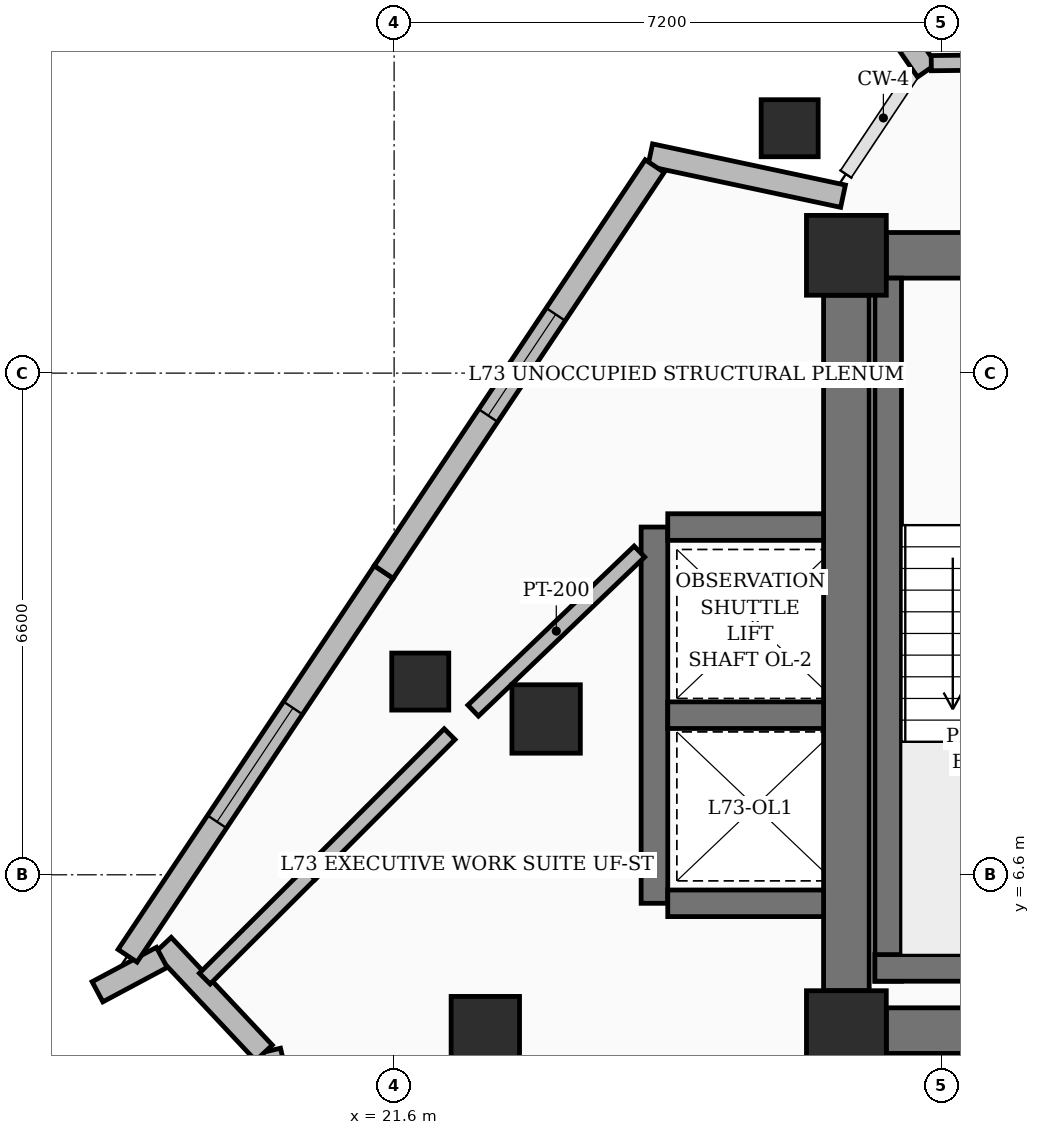
"""IFC4 building model, lengths in metres.
Left out: names, types, materials, properties, quantities, classifications, styles, units other than length and angle.
Written with IfcOpenShell. Run it as: python <this file> out.ifc"""

import sys

from ifc_helpers import new_model, si_unit, direction, frame, frame_2d, origin, origin_2d, place, context, subcontext, project, spatial, rectangle, extrude, element, fill, save


model = new_model("IFC4")
c1 = context("Model", 3, precision=1e-05, world=origin(), true_north=direction((0.0, 1.0)))
c2 = subcontext(c1, "Body", "Model", "MODEL_VIEW")
j1 = project(units=[si_unit("LENGTHUNIT", "METRE"), si_unit("PLANEANGLEUNIT", "RADIAN")], contexts=[c1])
p1 = place(None, origin())
s1 = spatial("IfcSite", under=j1, at=p1, CompositionType="ELEMENT")
p2 = place(p1, origin())
s2 = spatial("IfcBuilding", under=s1, at=p2, CompositionType="ELEMENT")
p3 = place(p2, frame((0.0, 0.0, 282.0)))
s3 = spatial("IfcBuildingStorey", under=s2, at=p3, CompositionType="ELEMENT", Elevation=282.0)
for number, where, z_axis, x_axis in (
    (1, (27.55, 4.55, 0.0), (0.0, 0.0, 1.0), (1.0, 0.0, 0.0)),
    (2, (27.55, 14.75, 0.0), (0.0, 0.0, 1.0), (1.0, 0.0, 0.0)),
):
    element("IfcColumn", number, at=place(p3, frame(where, z_axis=z_axis, x_axis=x_axis)), inside=s3, PredefinedType="COLUMN", context=c2, shape_type="SweptSolid", body=[
        extrude(rectangle(XDim=1.05, YDim=1.05, at=origin_2d()), origin(), (0.0, 0.0, 1.0), 3.75),
    ])
for number, where, z_axis, x_axis in (
    (3, (22.8, 4.55, 0.0), (0.0, 0.0, 1.0), (1.0, 0.0, 0.0)),
    (4, (23.6, 8.65, 0.0), (0.0, 0.0, 1.0), (1.0, 0.0, 0.0)),
):
    element("IfcColumn", number, at=place(p3, frame(where, z_axis=z_axis, x_axis=x_axis)), inside=s3, PredefinedType="COLUMN", context=c2, shape_type="SweptSolid", body=[
        extrude(rectangle(XDim=0.9, YDim=0.9, at=origin_2d()), origin(), (0.0, 0.0, 1.0), 3.75),
    ])
p4 = place(p3, frame((28.075, 4.55, 0.0), z_axis=(0.0, 0.0, 1.0), x_axis=(1.0, 0.0, 0.0)))
e5 = element("IfcWall", 5, at=p4, inside=s3, PredefinedType="SHEAR", context=c2, shape_type="SweptSolid", body=[
    extrude(rectangle(XDim=6.55, YDim=0.6, at=frame_2d((3.275, 0.0))), origin(), (0.0, 0.0, 1.0), 3.75),
])
p5 = place(p3, frame((28.075, 14.75, 0.0), z_axis=(0.0, 0.0, 1.0), x_axis=(1.0, 0.0, 0.0)))
e6 = element("IfcWall", 6, at=p5, inside=s3, PredefinedType="SHEAR", context=c2, shape_type="SweptSolid", body=[
    extrude(rectangle(XDim=6.55, YDim=0.6, at=frame_2d((3.275, 0.0))), origin(), (0.0, 0.0, 1.0), 3.75),
])
p6 = place(p5, frame((1.1, 0.0, 0.0)))
e7 = element("IfcOpeningElement", 7, at=p6, cuts=e6, PredefinedType="OPENING", context=c2, shape_type="SweptSolid", body=[
    extrude(rectangle(XDim=1.05, YDim=2.15, at=frame_2d((0.525, 1.075))), frame((0.0, 0.31, 0.0), z_axis=(0.0, -1.0, 0.0), x_axis=(1.0, 0.0, 0.0)), (0.0, 0.0, 1.0), 0.62),
])
p7 = place(p5, frame((4.29, 0.0, 0.0)))
e8 = element("IfcOpeningElement", 8, at=p7, cuts=e6, PredefinedType="OPENING", context=c2, shape_type="SweptSolid", body=[
    extrude(rectangle(XDim=0.95, YDim=2.15, at=frame_2d((0.475, 1.075))), frame((0.0, 0.31, 0.0), z_axis=(0.0, -1.0, 0.0), x_axis=(1.0, 0.0, 0.0)), (0.0, 0.0, 1.0), 0.62),
])
p8 = place(p3, frame((27.55, 5.075, 0.0), z_axis=(0.0, 0.0, 1.0), x_axis=(0.0, 1.0, 0.0)))
e9 = element("IfcWall", 9, at=p8, inside=s3, PredefinedType="SHEAR", context=c2, shape_type="SweptSolid", body=[
    extrude(rectangle(XDim=9.15, YDim=0.6, at=frame_2d((4.575, 0.0))), origin(), (0.0, 0.0, 1.0), 3.75),
])
p9 = place(p3, frame((28.1, 5.2, 0.0), z_axis=(0.0, 0.0, 1.0), x_axis=(0.0, 1.0, 0.0)))
e10 = element("IfcWall", 10, at=p9, inside=s3, PredefinedType="SOLIDWALL", context=c2, shape_type="SweptSolid", body=[
    extrude(rectangle(XDim=9.25, YDim=0.35, at=frame_2d((4.625, 0.0))), origin(), (0.0, 0.0, 1.0), 3.75),
])
p10 = place(p3, frame((27.925, 5.375, 0.0), z_axis=(0.0, 0.0, 1.0), x_axis=(1.0, 0.0, 0.0)))
e11 = element("IfcWall", 11, at=p10, inside=s3, PredefinedType="SOLIDWALL", context=c2, shape_type="SweptSolid", body=[
    extrude(rectangle(XDim=3.55, YDim=0.35, at=frame_2d((1.775, 0.0))), origin(), (0.0, 0.0, 1.0), 3.75),
])
p11 = place(p3, frame((25.025, 6.225, 0.0), z_axis=(0.0, 0.0, 1.0), x_axis=(0.0, 1.0, 0.0)))
e12 = element("IfcWall", 12, at=p11, inside=s3, PredefinedType="SOLIDWALL", context=c2, shape_type="SweptSolid", body=[
    extrude(rectangle(XDim=4.95, YDim=0.35, at=frame_2d((2.475, 0.0))), origin(), (0.0, 0.0, 1.0), 3.75),
])
for number, where, z_axis, x_axis in (
    (13, (25.2, 6.225, 0.0), (0.0, 0.0, 1.0), (1.0, 0.0, 0.0)),
    (14, (25.2, 8.7, 0.0), (0.0, 0.0, 1.0), (1.0, 0.0, 0.0)),
    (15, (25.2, 11.175, 0.0), (0.0, 0.0, 1.0), (1.0, 0.0, 0.0)),
):
    element("IfcWall", number, at=place(p3, frame(where, z_axis=z_axis, x_axis=x_axis)), inside=s3, PredefinedType="SOLIDWALL", context=c2, shape_type="SweptSolid", body=[
        extrude(rectangle(XDim=2.05, YDim=0.35, at=frame_2d((1.025, 0.0))), origin(), (0.0, 0.0, 1.0), 3.75),
    ])
for number, where, z_axis, x_axis in (
    (16, (26.804, 16.422, 0.0), (0.0, 0.0, 1.0), (1.0, 0.0, 0.0)),
    (17, (21.944, 9.142, 0.0), (0.0, 0.0, 1.0), (1.0, 0.0, 0.0)),
):
    element("IfcColumn", number, at=place(p3, frame(where, z_axis=z_axis, x_axis=x_axis)), inside=s3, PredefinedType="COLUMN", context=c2, shape_type="SweptSolid", body=[
        extrude(rectangle(XDim=0.75, YDim=0.75, at=origin_2d()), origin(), (0.0, 0.0, 1.0), 3.75),
    ])
p12 = place(p3, frame((24.969, 16.069, 0.0), z_axis=(0.0, 0.0, 1.0), x_axis=(0.977987970982, -0.208661277227, 0.0)))
e18 = element("IfcWall", 18, at=p12, inside=s3, PredefinedType="SOLIDWALL", context=c2, shape_type="SweptSolid", body=[
    extrude(rectangle(XDim=2.594, YDim=0.3, at=frame_2d((1.297, 0.0))), origin(), (0.0, 0.0, 1.0), 2.696),
])
p13 = place(p3, frame((28.61, 17.181, 0.0), z_axis=(0.0, 0.0, 1.0), x_axis=(-0.567878097956, 0.823112668996, 0.0)))
e19 = element("IfcWall", 19, at=p13, inside=s3, PredefinedType="SOLIDWALL", context=c2, shape_type="SweptSolid", body=[
    extrude(rectangle(XDim=2.594, YDim=0.3, at=frame_2d((1.297, 0.0))), origin(), (0.0, 0.0, 1.0), 2.696),
])
p14 = place(p3, frame((20.404, 2.373, 0.0), z_axis=(0.0, 0.0, 1.0), x_axis=(-0.226376282289, 0.974039926706, 0.0)))
e20 = element("IfcWall", 20, at=p14, inside=s3, PredefinedType="SOLIDWALL", context=c2, shape_type="SweptSolid", body=[
    extrude(rectangle(XDim=1.963, YDim=0.3, at=frame_2d((0.981, 0.0))), origin(), (0.0, 0.0, 1.0), 3.5),
])
p15 = place(p3, frame((19.888, 4.257, 0.0), z_axis=(0.0, 0.0, 1.0), x_axis=(-0.684454988333, 0.72905512065, 0.0)))
e21 = element("IfcWall", 21, at=p15, inside=s3, PredefinedType="SOLIDWALL", context=c2, shape_type="SweptSolid", body=[
    extrude(rectangle(XDim=1.943, YDim=0.3, at=frame_2d((0.972, 0.0))), origin(), (0.0, 0.0, 1.0), 3.5),
])
p16 = place(p3, frame((18.544, 5.513, 0.0), z_axis=(0.0, 0.0, 1.0), x_axis=(-0.881986380724, -0.471274892412, 0.0)))
e22 = element("IfcWall", 22, at=p16, inside=s3, PredefinedType="SOLIDWALL", context=c2, shape_type="SweptSolid", body=[
    extrude(rectangle(XDim=0.959, YDim=0.3, at=frame_2d((0.48, 0.0))), origin(), (0.0, 0.0, 1.0), 3.5),
])
p17 = place(p3, frame((18.093, 5.535, 0.0), z_axis=(0.0, 0.0, 1.0), x_axis=(0.555210552044, 0.83170983095, 0.0)))
e23 = element("IfcWall", 23, at=p17, inside=s3, PredefinedType="SOLIDWALL", context=c2, shape_type="SweptSolid", body=[
    extrude(rectangle(XDim=6.07, YDim=0.3, at=frame_2d((3.035, 0.0))), origin(), (0.0, 0.0, 1.0), 3.5),
])
p18 = place(p17, frame((2.12, 0.0, 0.6)))
e24 = element("IfcOpeningElement", 24, at=p18, cuts=e23, PredefinedType="OPENING", context=c2, shape_type="SweptSolid", body=[
    extrude(rectangle(XDim=1.8, YDim=2.1, at=frame_2d((0.9, 1.05))), frame((0.0, 0.16, 0.0), z_axis=(0.0, -1.0, 0.0), x_axis=(1.0, 0.0, 0.0)), (0.0, 0.0, 1.0), 0.32),
])
p19 = place(p3, frame((21.463, 10.583, 0.0), z_axis=(0.0, 0.0, 1.0), x_axis=(0.55522657145, 0.831699136921, 0.0)))
e25 = element("IfcWall", 25, at=p19, inside=s3, PredefinedType="SOLIDWALL", context=c2, shape_type="SweptSolid", body=[
    extrude(rectangle(XDim=6.421, YDim=0.3, at=frame_2d((3.21, 0.0))), origin(), (0.0, 0.0, 1.0), 3.5),
])
p20 = place(p19, frame((2.475, 0.0, 0.55)))
e26 = element("IfcOpeningElement", 26, at=p20, cuts=e25, PredefinedType="OPENING", context=c2, shape_type="SweptSolid", body=[
    extrude(rectangle(XDim=1.6, YDim=2.2, at=frame_2d((0.8, 1.1))), frame((0.0, 0.16, 0.0), z_axis=(0.0, -1.0, 0.0), x_axis=(1.0, 0.0, 0.0)), (0.0, 0.0, 1.0), 0.32),
])
p21 = place(p3, frame((35.265, 17.349, 0.0), z_axis=(0.0, 0.0, 1.0), x_axis=(-0.999941633147, -0.010804179718, 0.0)))
e27 = element("IfcWall", 27, at=p21, inside=s3, PredefinedType="PARTITIONING", context=c2, shape_type="SweptSolid", body=[
    extrude(rectangle(XDim=6.598, YDim=0.2, at=frame_2d((3.299, 0.0))), origin(), (0.0, 0.0, 1.0), 2.685),
])
p22 = place(p21, frame((2.766, 0.0, 0.0)))
e28 = element("IfcOpeningElement", 28, at=p22, cuts=e27, PredefinedType="OPENING", context=c2, shape_type="SweptSolid", body=[
    extrude(rectangle(XDim=1.0, YDim=2.2, at=frame_2d((0.5, 1.1))), frame((0.0, 0.11, 0.0), z_axis=(0.0, -1.0, 0.0), x_axis=(1.0, 0.0, 0.0)), (0.0, 0.0, 1.0), 0.22),
])
p23 = place(p3, frame((24.827, 10.852, 0.0), z_axis=(0.0, 0.0, 1.0), x_axis=(-0.722620836198, -0.691244621746, 0.0)))
e29 = element("IfcWall", 29, at=p23, inside=s3, PredefinedType="PARTITIONING", context=c2, shape_type="SweptSolid", body=[
    extrude(rectangle(XDim=3.027, YDim=0.2, at=frame_2d((1.513, 0.0))), origin(), (0.0, 0.0, 1.0), 3.5),
])
p24 = place(p3, frame((20.49, 6.61, 0.0), z_axis=(0.0, 0.0, 1.0), x_axis=(0.707153691777, 0.707059867484, 0.0)))
e30 = element("IfcWall", 30, at=p24, inside=s3, PredefinedType="PARTITIONING", context=c2, shape_type="SweptSolid", body=[
    extrude(rectangle(XDim=2.602, YDim=0.2, at=frame_2d((1.301, 0.0))), origin(), (0.0, 0.0, 1.0), 2.691),
])
p25 = place(p3, frame((20.49, 6.61, 0.0), z_axis=(0.0, 0.0, 1.0), x_axis=(-0.708357851814, -0.705853493137, 0.0)))
e31 = element("IfcWall", 31, at=p25, inside=s3, PredefinedType="PARTITIONING", context=c2, shape_type="SweptSolid", body=[
    extrude(rectangle(XDim=1.95, YDim=0.2, at=frame_2d((0.975, 0.0))), origin(), (0.0, 0.0, 1.0), 3.5),
])
p26 = place(p18, origin())
e32 = element("IfcWindow", 32, at=p26, inside=s3, PartitioningType="SINGLE_PANEL", PredefinedType="WINDOW", context=c2, shape_type="SweptSolid", body=[
    extrude(rectangle(XDim=1.8, YDim=2.1, at=frame_2d((0.9, 1.05))), frame((0.0, 0.03, 0.0), z_axis=(0.0, -1.0, 0.0), x_axis=(1.0, 0.0, 0.0)), (0.0, 0.0, 1.0), 0.06),
])
fill(e24, e32)
p27 = place(p20, origin())
e33 = element("IfcWindow", 33, at=p27, inside=s3, PartitioningType="SINGLE_PANEL", PredefinedType="WINDOW", context=c2, shape_type="SweptSolid", body=[
    extrude(rectangle(XDim=1.6, YDim=2.2, at=frame_2d((0.8, 1.1))), frame((0.0, 0.03, 0.0), z_axis=(0.0, -1.0, 0.0), x_axis=(1.0, 0.0, 0.0)), (0.0, 0.0, 1.0), 0.06),
])
fill(e26, e33)
save(model, sys.argv[1])
